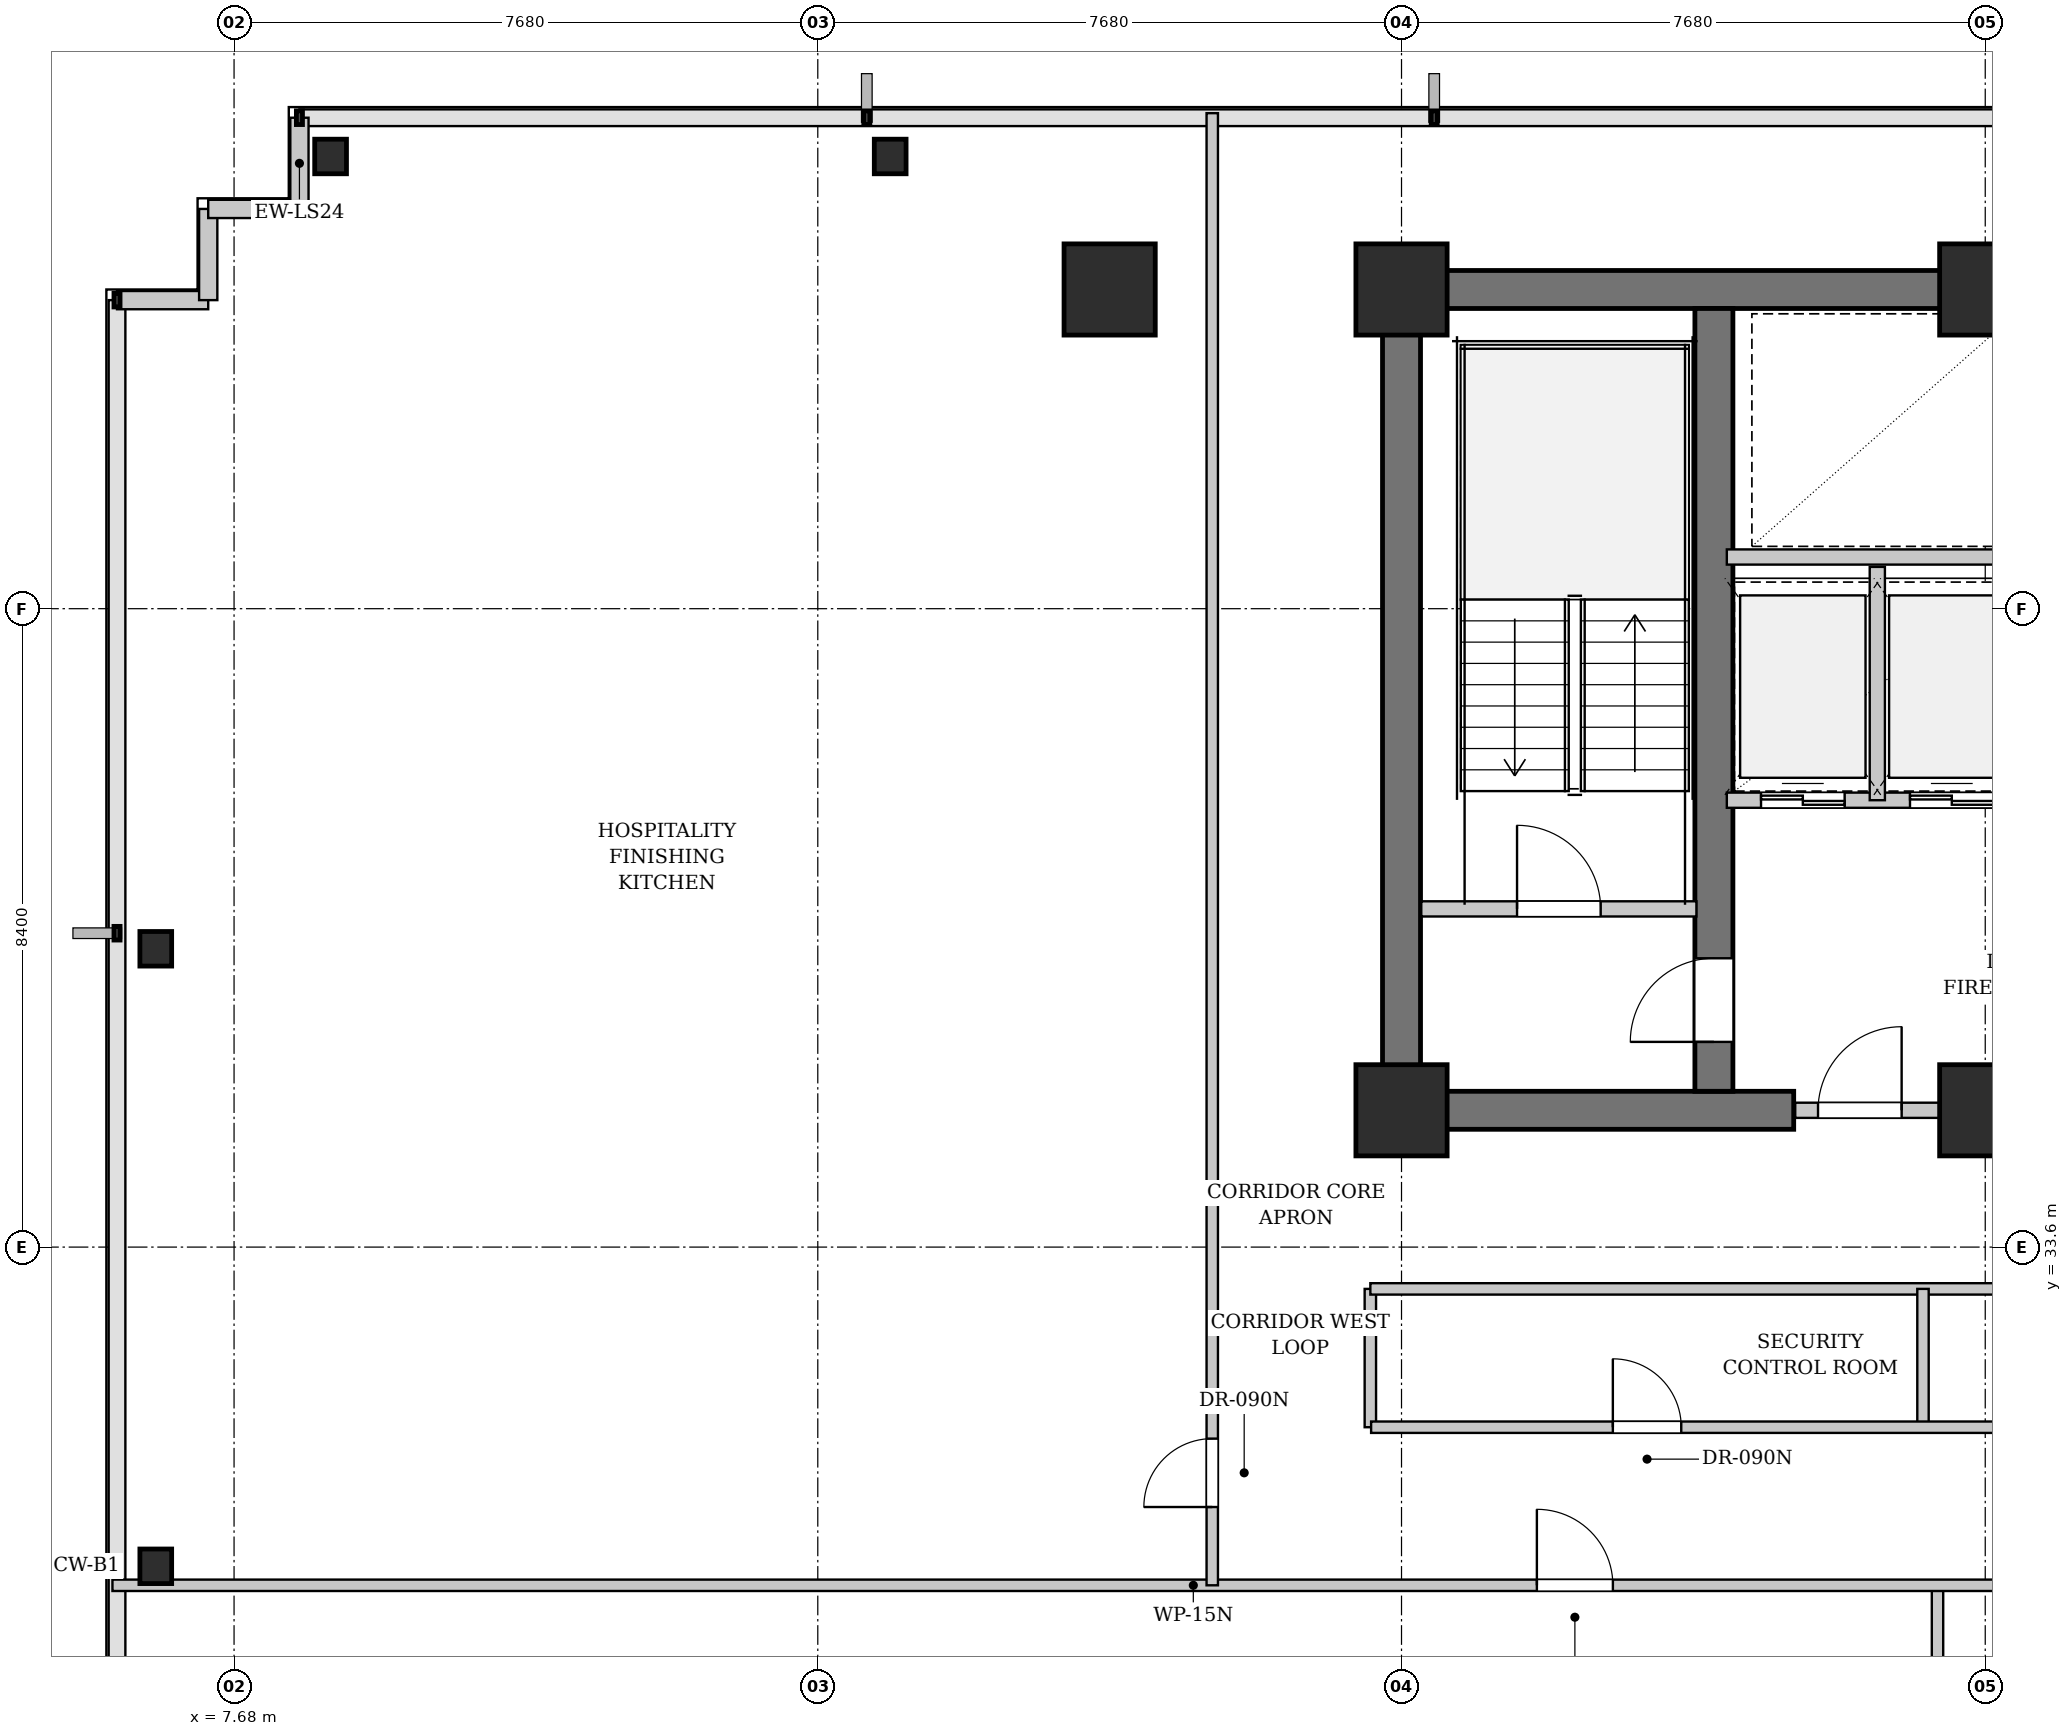
"""IFC4 building model, lengths in metres.
Left out: names, types, materials, properties, quantities, classifications, styles, units other than length and angle.
Written with IfcOpenShell. Run it as: python <this file> out.ifc"""

import sys

from ifc_helpers import new_model, si_unit, direction, frame, frame_2d, origin, origin_2d, place, context, subcontext, project, spatial, rectangle, i_section, extrude, element, fill, save


model = new_model("IFC4")
c1 = context("Model", 3, precision=1e-05, world=origin(), true_north=direction((0.0, 1.0)))
c2 = subcontext(c1, "Body", "Model", "MODEL_VIEW")
j1 = project(units=[si_unit("LENGTHUNIT", "METRE"), si_unit("PLANEANGLEUNIT", "RADIAN")], contexts=[c1])
p1 = place(None, origin())
s1 = spatial("IfcSite", under=j1, at=p1, CompositionType="ELEMENT")
p2 = place(p1, origin())
s2 = spatial("IfcBuilding", under=s1, at=p2, CompositionType="ELEMENT")
p3 = place(p2, frame((0.0, 0.0, 64.4)))
s3 = spatial("IfcBuildingStorey", under=s2, at=p3, CompositionType="ELEMENT", Elevation=64.4)
p4 = place(p3, frame((22.79, 46.2, 0.0), z_axis=(0.0, 0.0, 1.0), x_axis=(1.0, 0.0, 0.0)))
e1 = element("IfcWall", 1, at=p4, inside=s3, PredefinedType="SHEAR", context=c2, shape_type="SweptSolid", body=[
    extrude(rectangle(XDim=31.22, YDim=0.5, at=frame_2d((15.61, 0.0))), origin(), (0.0, 0.0, 1.0), 3.18),
])
p5 = place(p3, frame((22.79, 35.4, 0.0), z_axis=(0.0, 0.0, 1.0), x_axis=(1.0, 0.0, 0.0)))
e2 = element("IfcWall", 2, at=p5, inside=s3, PredefinedType="SHEAR", context=c2, shape_type="SweptSolid", body=[
    extrude(rectangle(XDim=5.41, YDim=0.5, at=frame_2d((2.705, 0.0))), origin(), (0.0, 0.0, 1.0), 3.18),
])
p6 = place(p3, frame((30.72, 35.4, 0.0), z_axis=(0.0, 0.0, 1.0), x_axis=(1.0, 0.0, 0.0)))
e3 = element("IfcWall", 3, at=p6, inside=s3, PredefinedType="SHEAR", context=c2, shape_type="SweptSolid", body=[
    extrude(rectangle(XDim=4.88, YDim=0.5, at=frame_2d((2.44, 0.0))), origin(), (0.0, 0.0, 1.0), 3.18),
])
p7 = place(p3, frame((23.04, 35.65, 0.0), z_axis=(0.0, 0.0, 1.0), x_axis=(0.0, 1.0, 0.0)))
e4 = element("IfcWall", 4, at=p7, inside=s3, PredefinedType="SHEAR", context=c2, shape_type="SweptSolid", body=[
    extrude(rectangle(XDim=10.3, YDim=0.5, at=frame_2d((5.15, 0.0))), origin(), (0.0, 0.0, 1.0), 3.18),
])
p8 = place(p3, frame((27.15, 35.65, 0.0), z_axis=(0.0, 0.0, 1.0), x_axis=(0.0, 1.0, 0.0)))
e5 = element("IfcWall", 5, at=p8, inside=s3, PredefinedType="SHEAR", context=c2, shape_type="SweptSolid", body=[
    extrude(rectangle(XDim=10.3, YDim=0.5, at=frame_2d((5.15, 0.0))), origin(), (0.0, 0.0, 1.0), 3.18),
])
p9 = place(p8, frame((0.65, 0.0, 0.0)))
e6 = element("IfcOpeningElement", 6, at=p9, cuts=e5, PredefinedType="OPENING", context=c2, shape_type="SweptSolid", body=[
    extrude(rectangle(XDim=1.1, YDim=2.15, at=frame_2d((0.55, 1.075))), frame((0.0, 0.26, 0.0), z_axis=(0.0, -1.0, 0.0), x_axis=(1.0, 0.0, 0.0)), (0.0, 0.0, 1.0), 0.52),
])
for number, where, z_axis, x_axis in (
    (7, (23.04, 35.4, 0.0), (0.0, 0.0, 1.0), (1.0, 0.0, 0.0)),
    (8, (23.04, 46.2, 0.0), (0.0, 0.0, 1.0), (1.0, 0.0, 0.0)),
    (9, (30.72, 35.4, 0.0), (0.0, 0.0, 1.0), (1.0, 0.0, 0.0)),
    (10, (30.72, 46.2, 0.0), (0.0, 0.0, 1.0), (1.0, 0.0, 0.0)),
    (11, (19.2, 46.2, 0.0), (0.0, 0.0, 1.0), (1.0, 0.0, 0.0)),
):
    element("IfcColumn", number, at=place(p3, frame(where, z_axis=z_axis, x_axis=x_axis)), inside=s3, PredefinedType="COLUMN", context=c2, shape_type="SweptSolid", body=[
        extrude(rectangle(XDim=1.2, YDim=1.2, at=origin_2d()), origin(), (0.0, 0.0, 1.0), 3.4),
    ])
for number, where, z_axis, x_axis in (
    (12, (8.95, 47.95, 0.0), (0.0, 0.0, 1.0), (1.0, 0.0, 0.0)),
    (13, (16.312, 47.95, 0.0), (0.0, 0.0, 1.0), (1.0, 0.0, 0.0)),
    (14, (6.65, 29.4, 0.0), (0.0, 0.0, 1.0), (1.0, 0.0, 0.0)),
    (15, (6.65, 37.525, 0.0), (0.0, 0.0, 1.0), (1.0, 0.0, 0.0)),
):
    element("IfcColumn", number, at=place(p3, frame(where, z_axis=z_axis, x_axis=x_axis)), inside=s3, PredefinedType="COLUMN", context=c2, shape_type="SweptSolid", body=[
        extrude(i_section(OverallWidth=0.418, OverallDepth=0.455, WebThickness=0.042, FlangeThickness=0.068, FilletRadius=0.015, at=origin_2d()), origin(), (0.0, 0.0, 1.0), 3.4),
    ])
p10 = place(p3, frame((6.14, 46.06, 0.0), z_axis=(0.0, 0.0, 1.0), x_axis=(1.0, 0.0, 0.0)))
e16 = element("IfcWall", 16, at=p10, inside=s3, PredefinedType="SOLIDWALL", context=c2, shape_type="SweptSolid", body=[
    extrude(rectangle(XDim=1.2, YDim=0.24, at=frame_2d((0.6, 0.0))), origin(), (0.0, 0.0, 1.0), 3.18),
])
for number, where, z_axis, x_axis in (
    (17, (7.34, 46.06, 0.0), (0.0, 0.0, 1.0), (0.0, 1.0, 0.0)),
    (18, (7.34, 47.26, 0.0), (0.0, 0.0, 1.0), (1.0, 0.0, 0.0)),
    (19, (8.54, 47.26, 0.0), (0.0, 0.0, 1.0), (0.0, 1.0, 0.0)),
):
    element("IfcWall", number, at=place(p3, frame(where, z_axis=z_axis, x_axis=x_axis)), inside=s3, PredefinedType="SOLIDWALL", context=c2, shape_type="SweptSolid", body=[
        extrude(rectangle(XDim=1.2, YDim=0.24, at=frame_2d((0.6, 0.0))), origin(), (0.0, 0.0, 1.0), 3.18),
    ])
p11 = place(p3, frame((23.3, 38.05, 0.0), z_axis=(0.0, 0.0, 1.0), x_axis=(1.0, 0.0, 0.0)))
e20 = element("IfcWall", 20, at=p11, inside=s3, PredefinedType="PARTITIONING", context=c2, shape_type="SweptSolid", body=[
    extrude(rectangle(XDim=3.62, YDim=0.2, at=frame_2d((1.81, 0.0))), origin(), (0.0, 0.0, 1.0), 3.18),
])
p12 = place(p11, frame((1.26, 0.0, 0.0)))
e21 = element("IfcOpeningElement", 21, at=p12, cuts=e20, PredefinedType="OPENING", context=c2, shape_type="SweptSolid", body=[
    extrude(rectangle(XDim=1.1, YDim=2.15, at=frame_2d((0.55, 1.075))), frame((0.0, 0.11, 0.0), z_axis=(0.0, -1.0, 0.0), x_axis=(1.0, 0.0, 0.0)), (0.0, 0.0, 1.0), 0.22),
])
p13 = place(p3, frame((28.22, 35.4, 0.0), z_axis=(0.0, 0.0, 1.0), x_axis=(1.0, 0.0, 0.0)))
e22 = element("IfcWall", 22, at=p13, inside=s3, PredefinedType="PARTITIONING", context=c2, shape_type="SweptSolid", body=[
    extrude(rectangle(XDim=2.5, YDim=0.2, at=frame_2d((1.25, 0.0))), origin(), (0.0, 0.0, 1.0), 2.475),
])
p14 = place(p13, frame((0.3, 0.0, 0.0)))
e23 = element("IfcOpeningElement", 23, at=p14, cuts=e22, PredefinedType="OPENING", context=c2, shape_type="SweptSolid", body=[
    extrude(rectangle(XDim=1.1, YDim=2.15, at=frame_2d((0.55, 1.075))), frame((0.0, 0.11, 0.0), z_axis=(0.0, -1.0, 0.0), x_axis=(1.0, 0.0, 0.0)), (0.0, 0.0, 1.0), 0.22),
])
p15 = place(p3, frame((27.32, 39.48, 0.0), z_axis=(0.0, 0.0, 1.0), x_axis=(1.0, 0.0, 0.0)))
e24 = element("IfcWall", 24, at=p15, inside=s3, PredefinedType="PARTITIONING", context=c2, shape_type="SweptSolid", body=[
    extrude(rectangle(XDim=3.94, YDim=0.2, at=frame_2d((1.97, 0.0))), origin(), (0.0, 0.0, 1.0), 3.18),
])
p16 = place(p15, frame((0.45, 0.0, 0.0)))
e25 = element("IfcOpeningElement", 25, at=p16, cuts=e24, PredefinedType="OPENING", context=c2, shape_type="SweptSolid", body=[
    extrude(rectangle(XDim=1.1, YDim=2.2, at=frame_2d((0.55, 1.1))), frame((0.0, 0.11, 0.0), z_axis=(0.0, -1.0, 0.0), x_axis=(1.0, 0.0, 0.0)), (0.0, 0.0, 1.0), 0.22),
])
p17 = place(p15, frame((2.41, 0.0, 0.0)))
e26 = element("IfcOpeningElement", 26, at=p17, cuts=e24, PredefinedType="OPENING", context=c2, shape_type="SweptSolid", body=[
    extrude(rectangle(XDim=1.1, YDim=2.2, at=frame_2d((0.55, 1.1))), frame((0.0, 0.11, 0.0), z_axis=(0.0, -1.0, 0.0), x_axis=(1.0, 0.0, 0.0)), (0.0, 0.0, 1.0), 0.22),
])
p18 = place(p3, frame((29.3, 39.48, 0.0), z_axis=(0.0, 0.0, 1.0), x_axis=(0.0, 1.0, 0.0)))
e27 = element("IfcWall", 27, at=p18, inside=s3, PredefinedType="PARTITIONING", context=c2, shape_type="SweptSolid", body=[
    extrude(rectangle(XDim=3.07, YDim=0.2, at=frame_2d((1.535, 0.0))), origin(), (0.0, 0.0, 1.0), 3.18),
])
p19 = place(p3, frame((27.32, 42.68, 0.0), z_axis=(0.0, 0.0, 1.0), x_axis=(1.0, 0.0, 0.0)))
e28 = element("IfcWall", 28, at=p19, inside=s3, PredefinedType="PARTITIONING", context=c2, shape_type="SweptSolid", body=[
    extrude(rectangle(XDim=5.33, YDim=0.2, at=frame_2d((2.665, 0.0))), origin(), (0.0, 0.0, 1.0), 3.18),
])
p20 = place(p19, frame((4.18, 0.0, 0.0)))
e29 = element("IfcOpeningElement", 29, at=p20, cuts=e28, PredefinedType="OPENING", context=c2, shape_type="SweptSolid", body=[
    extrude(rectangle(XDim=0.9, YDim=2.15, at=frame_2d((0.45, 1.075))), frame((0.0, 0.11, 0.0), z_axis=(0.0, -1.0, 0.0), x_axis=(1.0, 0.0, 0.0)), (0.0, 0.0, 1.0), 0.22),
])
p21 = place(p3, frame((30.092, 10.28, 0.0), z_axis=(0.0, 0.0, 1.0), x_axis=(0.0, 1.0, 0.0)))
e30 = element("IfcWall", 30, at=p21, inside=s3, PredefinedType="PARTITIONING", context=c2, shape_type="SweptSolid", body=[
    extrude(rectangle(XDim=18.89, YDim=0.15, at=frame_2d((9.445, 0.0))), origin(), (0.0, 0.0, 1.0), 3.18),
])
p22 = place(p3, frame((6.08, 29.15, 0.0), z_axis=(0.0, 0.0, 1.0), x_axis=(1.0, 0.0, 0.0)))
e31 = element("IfcWall", 31, at=p22, inside=s3, PredefinedType="PARTITIONING", context=c2, shape_type="SweptSolid", body=[
    extrude(rectangle(XDim=64.64, YDim=0.15, at=frame_2d((32.32, 0.0))), origin(), (0.0, 0.0, 1.0), 3.18),
])
p23 = place(p22, frame((18.741, 0.0, 0.0)))
e32 = element("IfcOpeningElement", 32, at=p23, cuts=e31, PredefinedType="OPENING", context=c2, shape_type="SweptSolid", body=[
    extrude(rectangle(XDim=1.0, YDim=2.15, at=frame_2d((0.5, 1.075))), frame((0.0, 0.085, 0.0), z_axis=(0.0, -1.0, 0.0), x_axis=(1.0, 0.0, 0.0)), (0.0, 0.0, 1.0), 0.17),
])
p24 = place(p22, frame((29.245, 0.0, 0.0)))
e33 = element("IfcOpeningElement", 33, at=p24, cuts=e31, PredefinedType="OPENING", context=c2, shape_type="SweptSolid", body=[
    extrude(rectangle(XDim=1.0, YDim=2.15, at=frame_2d((0.5, 1.075))), frame((0.0, 0.085, 0.0), z_axis=(0.0, -1.0, 0.0), x_axis=(1.0, 0.0, 0.0)), (0.0, 0.0, 1.0), 0.17),
])
p25 = place(p22, frame((38.64, 0.0, 0.0)))
e34 = element("IfcOpeningElement", 34, at=p25, cuts=e31, PredefinedType="OPENING", context=c2, shape_type="SweptSolid", body=[
    extrude(rectangle(XDim=1.0, YDim=2.15, at=frame_2d((0.5, 1.075))), frame((0.0, 0.085, 0.0), z_axis=(0.0, -1.0, 0.0), x_axis=(1.0, 0.0, 0.0)), (0.0, 0.0, 1.0), 0.17),
])
p26 = place(p22, frame((46.011, 0.0, 0.0)))
e35 = element("IfcOpeningElement", 35, at=p26, cuts=e31, PredefinedType="OPENING", context=c2, shape_type="SweptSolid", body=[
    extrude(rectangle(XDim=1.0, YDim=2.15, at=frame_2d((0.5, 1.075))), frame((0.0, 0.085, 0.0), z_axis=(0.0, -1.0, 0.0), x_axis=(1.0, 0.0, 0.0)), (0.0, 0.0, 1.0), 0.17),
])
p27 = place(p3, frame((20.55, 29.15, 0.0), z_axis=(0.0, 0.0, 1.0), x_axis=(0.0, 1.0, 0.0)))
e36 = element("IfcWall", 36, at=p27, inside=s3, PredefinedType="PARTITIONING", context=c2, shape_type="SweptSolid", body=[
    extrude(rectangle(XDim=19.37, YDim=0.15, at=frame_2d((9.685, 0.0))), origin(), (0.0, 0.0, 1.0), 3.18),
])
p28 = place(p27, frame((1.03, 0.0, 0.0)))
e37 = element("IfcOpeningElement", 37, at=p28, cuts=e36, PredefinedType="OPENING", context=c2, shape_type="SweptSolid", body=[
    extrude(rectangle(XDim=0.9, YDim=2.15, at=frame_2d((0.45, 1.075))), frame((0.0, 0.085, 0.0), z_axis=(0.0, -1.0, 0.0), x_axis=(1.0, 0.0, 0.0)), (0.0, 0.0, 1.0), 0.17),
])
p29 = place(p3, frame((22.63, 31.23, 0.0), z_axis=(0.0, 0.0, 1.0), x_axis=(0.0, 1.0, 0.0)))
e38 = element("IfcWall", 38, at=p29, inside=s3, PredefinedType="PARTITIONING", context=c2, shape_type="SweptSolid", body=[
    extrude(rectangle(XDim=1.82, YDim=0.15, at=frame_2d((0.91, 0.0))), origin(), (0.0, 0.0, 1.0), 3.18),
])
p30 = place(p3, frame((22.63, 33.05, 0.0), z_axis=(0.0, 0.0, 1.0), x_axis=(1.0, 0.0, 0.0)))
e39 = element("IfcWall", 39, at=p30, inside=s3, PredefinedType="PARTITIONING", context=c2, shape_type="SweptSolid", body=[
    extrude(rectangle(XDim=31.59, YDim=0.15, at=frame_2d((15.795, 0.0))), origin(), (0.0, 0.0, 1.0), 3.18),
])
p31 = place(p3, frame((29.901, 31.23, 0.0), z_axis=(0.0, 0.0, 1.0), x_axis=(0.0, 1.0, 0.0)))
e40 = element("IfcWall", 40, at=p31, inside=s3, PredefinedType="PARTITIONING", context=c2, shape_type="SweptSolid", body=[
    extrude(rectangle(XDim=1.82, YDim=0.15, at=frame_2d((0.91, 0.0))), origin(), (0.0, 0.0, 1.0), 3.18),
])
p32 = place(p3, frame((22.64, 31.23, 0.0), z_axis=(0.0, 0.0, 1.0), x_axis=(1.0, 0.0, 0.0)))
e41 = element("IfcWall", 41, at=p32, inside=s3, PredefinedType="PARTITIONING", context=c2, shape_type="SweptSolid", body=[
    extrude(rectangle(XDim=31.57, YDim=0.15, at=frame_2d((15.785, 0.0))), origin(), (0.0, 0.0, 1.0), 3.18),
])
p33 = place(p32, frame((3.18, 0.0, 0.0)))
e42 = element("IfcOpeningElement", 42, at=p33, cuts=e41, PredefinedType="OPENING", context=c2, shape_type="SweptSolid", body=[
    extrude(rectangle(XDim=0.9, YDim=2.15, at=frame_2d((0.45, 1.075))), frame((0.0, 0.085, 0.0), z_axis=(0.0, -1.0, 0.0), x_axis=(1.0, 0.0, 0.0)), (0.0, 0.0, 1.0), 0.17),
])
p34 = place(p32, frame((12.493, 0.0, 0.0)))
e43 = element("IfcOpeningElement", 43, at=p34, cuts=e41, PredefinedType="OPENING", context=c2, shape_type="SweptSolid", body=[
    extrude(rectangle(XDim=0.9, YDim=2.15, at=frame_2d((0.45, 1.075))), frame((0.0, 0.085, 0.0), z_axis=(0.0, -1.0, 0.0), x_axis=(1.0, 0.0, 0.0)), (0.0, 0.0, 1.0), 0.17),
])
p35 = place(p32, frame((24.648, 0.0, 0.0)))
e44 = element("IfcOpeningElement", 44, at=p35, cuts=e41, PredefinedType="OPENING", context=c2, shape_type="SweptSolid", body=[
    extrude(rectangle(XDim=0.9, YDim=2.15, at=frame_2d((0.45, 1.075))), frame((0.0, 0.085, 0.0), z_axis=(0.0, -1.0, 0.0), x_axis=(1.0, 0.0, 0.0)), (0.0, 0.0, 1.0), 0.17),
])
p36 = place(p12, origin())
e45 = element("IfcDoor", 45, at=p36, inside=s3, OperationType="SINGLE_SWING_LEFT", PredefinedType="DOOR", context=c2, shape_type="SweptSolid", body=[
    extrude(rectangle(XDim=1.1, YDim=2.15, at=frame_2d((0.55, 1.075))), frame((0.0, 0.025, 0.0), z_axis=(0.0, -1.0, 0.0), x_axis=(1.0, 0.0, 0.0)), (0.0, 0.0, 1.0), 0.05),
])
fill(e21, e45)
p37 = place(p14, origin())
e46 = element("IfcDoor", 46, at=p37, inside=s3, OperationType="SINGLE_SWING_RIGHT", PredefinedType="DOOR", context=c2, shape_type="SweptSolid", body=[
    extrude(rectangle(XDim=1.1, YDim=2.15, at=frame_2d((0.55, 1.075))), frame((0.0, 0.025, 0.0), z_axis=(0.0, -1.0, 0.0), x_axis=(1.0, 0.0, 0.0)), (0.0, 0.0, 1.0), 0.05),
])
fill(e23, e46)
p38 = place(p16, origin())
e47 = element("IfcDoor", 47, at=p38, inside=s3, OperationType="DOUBLE_DOOR_SLIDING", PredefinedType="DOOR", context=c2, shape_type="SweptSolid", body=[
    extrude(rectangle(XDim=1.1, YDim=2.2, at=frame_2d((0.55, 1.1))), frame((0.0, 0.025, 0.0), z_axis=(0.0, -1.0, 0.0), x_axis=(1.0, 0.0, 0.0)), (0.0, 0.0, 1.0), 0.05),
])
fill(e25, e47)
p39 = place(p17, origin())
e48 = element("IfcDoor", 48, at=p39, inside=s3, OperationType="DOUBLE_DOOR_SLIDING", PredefinedType="DOOR", context=c2, shape_type="SweptSolid", body=[
    extrude(rectangle(XDim=1.1, YDim=2.2, at=frame_2d((0.55, 1.1))), frame((0.0, 0.025, 0.0), z_axis=(0.0, -1.0, 0.0), x_axis=(1.0, 0.0, 0.0)), (0.0, 0.0, 1.0), 0.05),
])
fill(e26, e48)
p40 = place(p23, origin())
e49 = element("IfcDoor", 49, at=p40, inside=s3, OperationType="SINGLE_SWING_LEFT", PredefinedType="DOOR", context=c2, shape_type="SweptSolid", body=[
    extrude(rectangle(XDim=1.0, YDim=2.15, at=frame_2d((0.5, 1.075))), frame((0.0, 0.025, 0.0), z_axis=(0.0, -1.0, 0.0), x_axis=(1.0, 0.0, 0.0)), (0.0, 0.0, 1.0), 0.05),
])
fill(e32, e49)
p41 = place(p28, origin())
e50 = element("IfcDoor", 50, at=p41, inside=s3, OperationType="SINGLE_SWING_LEFT", PredefinedType="DOOR", context=c2, shape_type="SweptSolid", body=[
    extrude(rectangle(XDim=0.9, YDim=2.15, at=frame_2d((0.45, 1.075))), frame((0.0, 0.025, 0.0), z_axis=(0.0, -1.0, 0.0), x_axis=(1.0, 0.0, 0.0)), (0.0, 0.0, 1.0), 0.05),
])
fill(e37, e50)
p42 = place(p33, origin())
e51 = element("IfcDoor", 51, at=p42, inside=s3, OperationType="SINGLE_SWING_LEFT", PredefinedType="DOOR", context=c2, shape_type="SweptSolid", body=[
    extrude(rectangle(XDim=0.9, YDim=2.15, at=frame_2d((0.45, 1.075))), frame((0.0, 0.025, 0.0), z_axis=(0.0, -1.0, 0.0), x_axis=(1.0, 0.0, 0.0)), (0.0, 0.0, 1.0), 0.05),
])
fill(e42, e51)
p43 = place(p9, origin())
e52 = element("IfcDoor", 52, at=p43, inside=s3, OperationType="SINGLE_SWING_LEFT", PredefinedType="DOOR", context=c2, shape_type="SweptSolid", body=[
    extrude(rectangle(XDim=1.1, YDim=2.15, at=frame_2d((0.55, 1.075))), frame((0.0, 0.025, 0.0), z_axis=(0.0, -1.0, 0.0), x_axis=(1.0, 0.0, 0.0)), (0.0, 0.0, 1.0), 0.05),
])
fill(e6, e52)
save(model, sys.argv[1])
